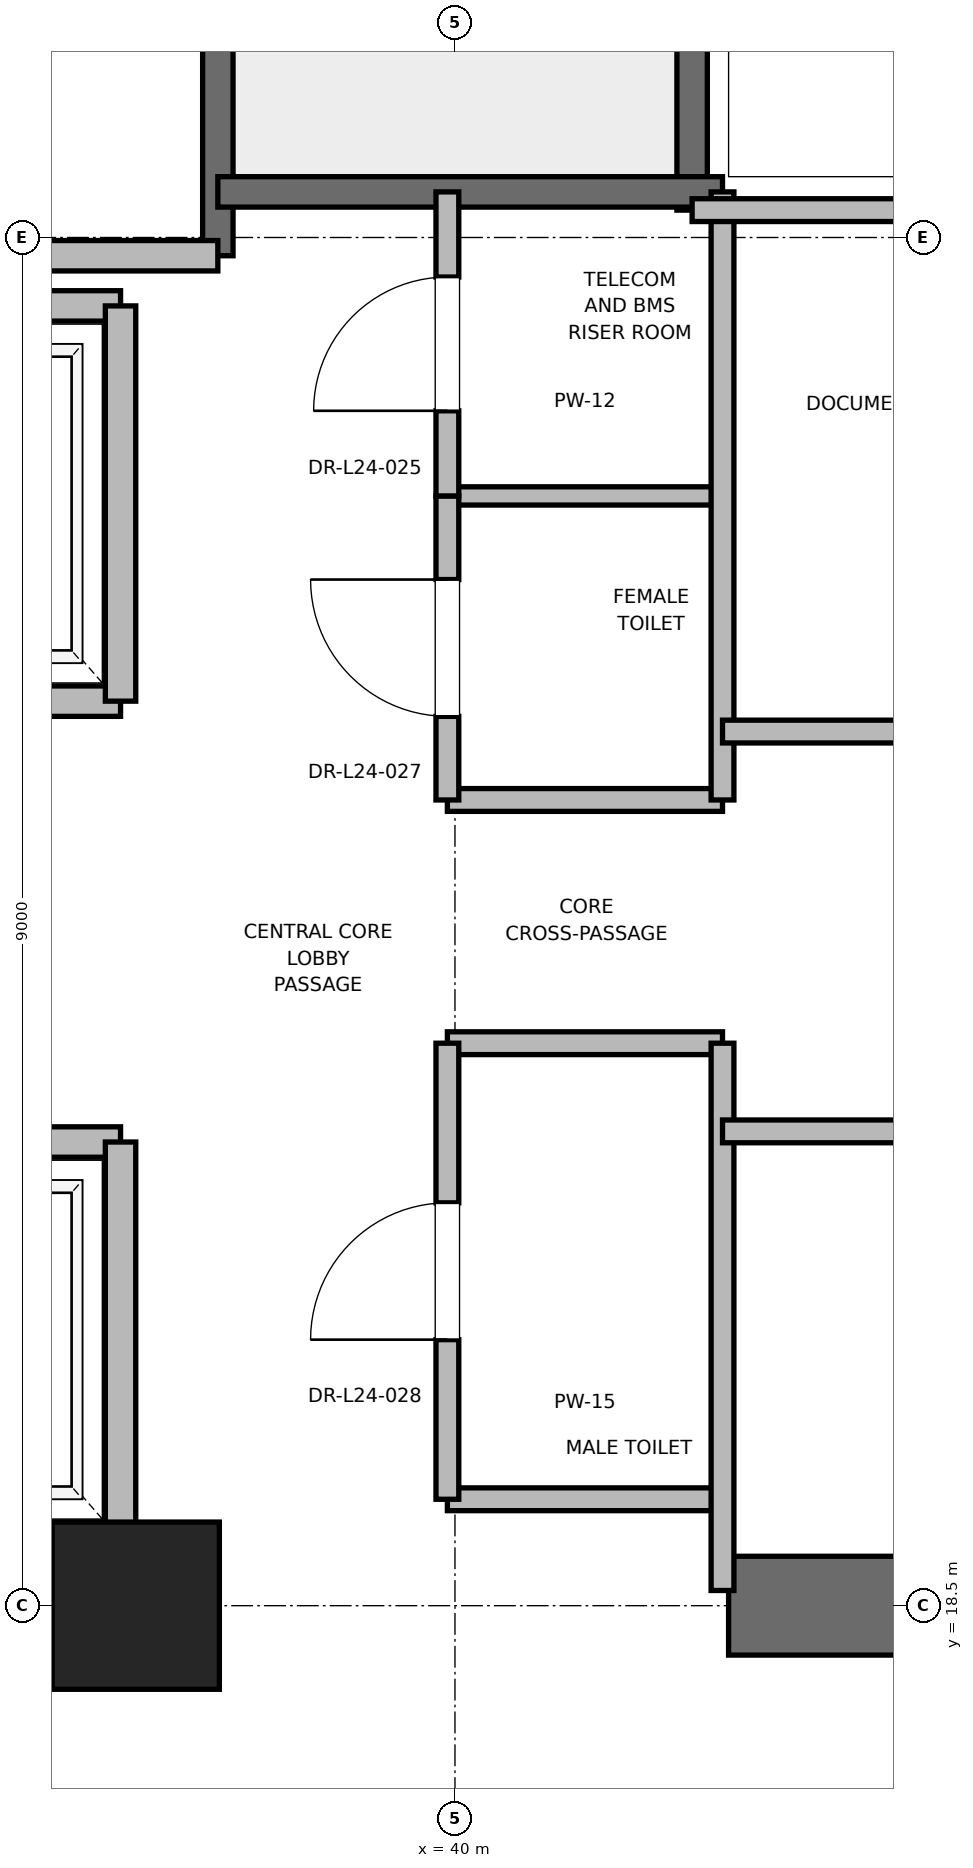
"""IFC4 building model, lengths in metres.
Left out: names, types, materials, properties, quantities, classifications, styles, units other than length and angle.
Written with IfcOpenShell. Run it as: python <this file> out.ifc"""

import sys

from ifc_helpers import new_model, si_unit, direction, frame, frame_2d, origin, origin_2d, place, context, subcontext, project, spatial, rectangle, extrude, element, fill, save


model = new_model("IFC4")
c1 = context("Model", 3, precision=1e-05, world=origin(), true_north=direction((0.0, 1.0)))
c2 = subcontext(c1, "Body", "Model", "MODEL_VIEW")
j1 = project(units=[si_unit("LENGTHUNIT", "METRE"), si_unit("PLANEANGLEUNIT", "RADIAN")], contexts=[c1])
p1 = place(None, origin())
s1 = spatial("IfcSite", under=j1, at=p1, CompositionType="ELEMENT")
p2 = place(p1, origin())
s2 = spatial("IfcBuilding", under=s1, at=p2, CompositionType="ELEMENT")
p3 = place(p2, frame((0.0, 0.0, 103.6)))
s3 = spatial("IfcBuildingStorey", under=s2, at=p3, CompositionType="ELEMENT", Elevation=103.6)
p4 = place(p3, frame((37.9, 18.5, 0.0), z_axis=(0.0, 0.0, 1.0), x_axis=(1.0, 0.0, 0.0)))
e1 = element("IfcColumn", 1, at=p4, inside=s3, PredefinedType="PILASTER", context=c2, shape_type="SweptSolid", body=[
    extrude(rectangle(XDim=1.1, YDim=1.1, at=origin_2d()), origin(), (0.0, 0.0, 1.0), 4.0),
])
for number, where, z_axis, x_axis in (
    (2, (29.0, 18.5, 0.0), (0.0, 0.0, 1.0), (1.0, 0.0, 0.0)),
    (3, (41.8, 18.5, 0.0), (0.0, 0.0, 1.0), (1.0, 0.0, 0.0)),
):
    element("IfcWall", number, at=place(p3, frame(where, z_axis=z_axis, x_axis=x_axis)), inside=s3, PredefinedType="SHEAR", context=c2, shape_type="SweptSolid", body=[
        extrude(rectangle(XDim=9.2, YDim=0.65, at=frame_2d((4.6, 0.0))), origin(), (0.0, 0.0, 1.0), 3.7),
    ])
p5 = place(p3, frame((38.44, 27.38, 0.0), z_axis=(0.0, 0.0, 1.0), x_axis=(0.0, 1.0, 0.0)))
e4 = element("IfcWall", 4, at=p5, inside=s3, PredefinedType="SOLIDWALL", context=c2, shape_type="SweptSolid", body=[
    extrude(rectangle(XDim=8.87, YDim=0.2, at=frame_2d((4.435, 0.0))), origin(), (0.0, 0.0, 1.0), 3.7),
])
p6 = place(p3, frame((41.56, 27.68, 0.0), z_axis=(0.0, 0.0, 1.0), x_axis=(0.0, 1.0, 0.0)))
e5 = element("IfcWall", 5, at=p6, inside=s3, PredefinedType="SOLIDWALL", context=c2, shape_type="SweptSolid", body=[
    extrude(rectangle(XDim=8.57, YDim=0.2, at=frame_2d((4.285, 0.0))), origin(), (0.0, 0.0, 1.0), 3.7),
])
p7 = place(p3, frame((38.44, 27.8, 0.0), z_axis=(0.0, 0.0, 1.0), x_axis=(1.0, 0.0, 0.0)))
e6 = element("IfcWall", 6, at=p7, inside=s3, PredefinedType="SOLIDWALL", context=c2, shape_type="SweptSolid", body=[
    extrude(rectangle(XDim=3.32, YDim=0.2, at=frame_2d((1.66, 0.0))), origin(), (0.0, 0.0, 1.0), 3.7),
])
p8 = place(p3, frame((32.82, 27.38, 0.0), z_axis=(0.0, 0.0, 1.0), x_axis=(1.0, 0.0, 0.0)))
e7 = element("IfcWall", 7, at=p8, inside=s3, PredefinedType="PARTITIONING", context=c2, shape_type="SweptSolid", body=[
    extrude(rectangle(XDim=5.62, YDim=0.2, at=frame_2d((2.81, 0.0))), origin(), (0.0, 0.0, 1.0), 3.7),
])
p9 = place(p3, frame((35.5, 18.95, 0.0), z_axis=(0.0, 0.0, 1.0), x_axis=(1.0, 0.0, 0.0)))
e8 = element("IfcWall", 8, at=p9, inside=s3, PredefinedType="SOLIDWALL", context=c2, shape_type="SweptSolid", body=[
    extrude(rectangle(XDim=2.3, YDim=0.2, at=frame_2d((1.15, 0.0))), origin(), (0.0, 0.0, 1.0), 2.48),
])
p10 = place(p3, frame((37.8, 21.55, 0.0), z_axis=(0.0, 0.0, 1.0), x_axis=(-1.0, 0.0, 0.0)))
e9 = element("IfcWall", 9, at=p10, inside=s3, PredefinedType="SOLIDWALL", context=c2, shape_type="SweptSolid", body=[
    extrude(rectangle(XDim=2.3, YDim=0.2, at=frame_2d((1.15, 0.0))), origin(), (0.0, 0.0, 1.0), 3.7),
])
p11 = place(p10, frame((0.6, 0.0, 0.0)))
e10 = element("IfcOpeningElement", 10, at=p11, cuts=e9, PredefinedType="OPENING", context=c2, shape_type="SweptSolid", body=[
    extrude(rectangle(XDim=1.1, YDim=2.2, at=frame_2d((0.55, 1.1))), frame((0.0, 0.1, 0.0), z_axis=(0.0, -1.0, 0.0), x_axis=(1.0, 0.0, 0.0)), (0.0, 0.0, 1.0), 0.2),
])
p12 = place(p3, frame((37.8, 18.95, 0.0), z_axis=(0.0, 0.0, 1.0), x_axis=(0.0, 1.0, 0.0)))
e11 = element("IfcWall", 11, at=p12, inside=s3, PredefinedType="SOLIDWALL", context=c2, shape_type="SweptSolid", body=[
    extrude(rectangle(XDim=2.6, YDim=0.2, at=frame_2d((1.3, 0.0))), origin(), (0.0, 0.0, 1.0), 2.48),
])
p13 = place(p3, frame((35.5, 24.45, 0.0), z_axis=(0.0, 0.0, 1.0), x_axis=(1.0, 0.0, 0.0)))
e12 = element("IfcWall", 12, at=p13, inside=s3, PredefinedType="SOLIDWALL", context=c2, shape_type="SweptSolid", body=[
    extrude(rectangle(XDim=2.3, YDim=0.2, at=frame_2d((1.15, 0.0))), origin(), (0.0, 0.0, 1.0), 3.7),
])
p14 = place(p13, frame((0.6, 0.0, 0.0)))
e13 = element("IfcOpeningElement", 13, at=p14, cuts=e12, PredefinedType="OPENING", context=c2, shape_type="SweptSolid", body=[
    extrude(rectangle(XDim=1.1, YDim=2.2, at=frame_2d((0.55, 1.1))), frame((0.0, 0.1, 0.0), z_axis=(0.0, -1.0, 0.0), x_axis=(1.0, 0.0, 0.0)), (0.0, 0.0, 1.0), 0.2),
])
p15 = place(p3, frame((37.8, 27.05, 0.0), z_axis=(0.0, 0.0, 1.0), x_axis=(-1.0, 0.0, 0.0)))
e14 = element("IfcWall", 14, at=p15, inside=s3, PredefinedType="SOLIDWALL", context=c2, shape_type="SweptSolid", body=[
    extrude(rectangle(XDim=2.3, YDim=0.2, at=frame_2d((1.15, 0.0))), origin(), (0.0, 0.0, 1.0), 3.7),
])
p16 = place(p3, frame((37.8, 24.45, 0.0), z_axis=(0.0, 0.0, 1.0), x_axis=(0.0, 1.0, 0.0)))
e15 = element("IfcWall", 15, at=p16, inside=s3, PredefinedType="SOLIDWALL", context=c2, shape_type="SweptSolid", body=[
    extrude(rectangle(XDim=2.6, YDim=0.2, at=frame_2d((1.3, 0.0))), origin(), (0.0, 0.0, 1.0), 3.7),
])
for number, where, z_axis, x_axis in (
    (16, (39.95, 19.2, 0.0), (0.0, 0.0, 1.0), (1.0, 0.0, 0.0)),
    (17, (39.95, 22.2, 0.0), (0.0, 0.0, 1.0), (1.0, 0.0, 0.0)),
    (18, (39.95, 23.8, 0.0), (0.0, 0.0, 1.0), (1.0, 0.0, 0.0)),
):
    element("IfcWall", number, at=place(p3, frame(where, z_axis=z_axis, x_axis=x_axis)), inside=s3, PredefinedType="PARTITIONING", context=c2, shape_type="SweptSolid", body=[
        extrude(rectangle(XDim=1.81, YDim=0.15, at=frame_2d((0.905, 0.0))), origin(), (0.0, 0.0, 1.0), 2.85),
    ])
p17 = place(p3, frame((39.95, 25.8, 0.0), z_axis=(0.0, 0.0, 1.0), x_axis=(1.0, 0.0, 0.0)))
e19 = element("IfcWall", 19, at=p17, inside=s3, PredefinedType="PARTITIONING", context=c2, shape_type="SweptSolid", body=[
    extrude(rectangle(XDim=1.81, YDim=0.12, at=frame_2d((0.905, 0.0))), origin(), (0.0, 0.0, 1.0), 2.85),
])
p18 = place(p3, frame((41.76, 18.6, 0.0), z_axis=(0.0, 0.0, 1.0), x_axis=(0.0, 1.0, 0.0)))
e20 = element("IfcWall", 20, at=p18, inside=s3, PredefinedType="PARTITIONING", context=c2, shape_type="SweptSolid", body=[
    extrude(rectangle(XDim=3.6, YDim=0.15, at=frame_2d((1.8, 0.0))), origin(), (0.0, 0.0, 1.0), 2.48),
])
p19 = place(p3, frame((41.76, 23.8, 0.0), z_axis=(0.0, 0.0, 1.0), x_axis=(0.0, 1.0, 0.0)))
e21 = element("IfcWall", 21, at=p19, inside=s3, PredefinedType="PARTITIONING", context=c2, shape_type="SweptSolid", body=[
    extrude(rectangle(XDim=4.0, YDim=0.15, at=frame_2d((2.0, 0.0))), origin(), (0.0, 0.0, 1.0), 2.85),
])
p20 = place(p3, frame((39.95, 19.2, 0.0), z_axis=(0.0, 0.0, 1.0), x_axis=(0.0, 1.0, 0.0)))
e22 = element("IfcWall", 22, at=p20, inside=s3, PredefinedType="PARTITIONING", context=c2, shape_type="SweptSolid", body=[
    extrude(rectangle(XDim=3.0, YDim=0.15, at=frame_2d((1.5, 0.0))), origin(), (0.0, 0.0, 1.0), 2.85),
])
p21 = place(p20, frame((1.05, 0.0, 0.0)))
e23 = element("IfcOpeningElement", 23, at=p21, cuts=e22, PredefinedType="OPENING", context=c2, shape_type="SweptSolid", body=[
    extrude(rectangle(XDim=0.9, YDim=2.1, at=frame_2d((0.45, 1.05))), frame((0.0, 0.075, 0.0), z_axis=(0.0, -1.0, 0.0), x_axis=(1.0, 0.0, 0.0)), (0.0, 0.0, 1.0), 0.15),
])
p22 = place(p3, frame((39.95, 23.8, 0.0), z_axis=(0.0, 0.0, 1.0), x_axis=(0.0, 1.0, 0.0)))
e24 = element("IfcWall", 24, at=p22, inside=s3, PredefinedType="PARTITIONING", context=c2, shape_type="SweptSolid", body=[
    extrude(rectangle(XDim=2.0, YDim=0.15, at=frame_2d((1.0, 0.0))), origin(), (0.0, 0.0, 1.0), 2.85),
])
p23 = place(p22, frame((0.55, 0.0, 0.0)))
e25 = element("IfcOpeningElement", 25, at=p23, cuts=e24, PredefinedType="OPENING", context=c2, shape_type="SweptSolid", body=[
    extrude(rectangle(XDim=0.9, YDim=2.1, at=frame_2d((0.45, 1.05))), frame((0.0, 0.075, 0.0), z_axis=(0.0, -1.0, 0.0), x_axis=(1.0, 0.0, 0.0)), (0.0, 0.0, 1.0), 0.15),
])
p24 = place(p3, frame((39.95, 25.8, 0.0), z_axis=(0.0, 0.0, 1.0), x_axis=(0.0, 1.0, 0.0)))
e26 = element("IfcWall", 26, at=p24, inside=s3, PredefinedType="PARTITIONING", context=c2, shape_type="SweptSolid", body=[
    extrude(rectangle(XDim=2.0, YDim=0.15, at=frame_2d((1.0, 0.0))), origin(), (0.0, 0.0, 1.0), 2.85),
])
p25 = place(p24, frame((0.56, 0.0, 0.0)))
e27 = element("IfcOpeningElement", 27, at=p25, cuts=e26, PredefinedType="OPENING", context=c2, shape_type="SweptSolid", body=[
    extrude(rectangle(XDim=0.88, YDim=2.1, at=frame_2d((0.44, 1.05))), frame((0.0, 0.075, 0.0), z_axis=(0.0, -1.0, 0.0), x_axis=(1.0, 0.0, 0.0)), (0.0, 0.0, 1.0), 0.15),
])
p26 = place(p3, frame((41.56, 27.68, 0.0), z_axis=(0.0, 0.0, 1.0), x_axis=(1.0, 0.0, 0.0)))
e28 = element("IfcWall", 28, at=p26, inside=s3, PredefinedType="PARTITIONING", context=c2, shape_type="SweptSolid", body=[
    extrude(rectangle(XDim=3.59, YDim=0.15, at=frame_2d((1.795, 0.0))), origin(), (0.0, 0.0, 1.0), 2.85),
])
p27 = place(p3, frame((41.76, 21.62, 0.0), z_axis=(0.0, 0.0, 1.0), x_axis=(1.0, 0.0, 0.0)))
e29 = element("IfcWall", 29, at=p27, inside=s3, PredefinedType="PARTITIONING", context=c2, shape_type="SweptSolid", body=[
    extrude(rectangle(XDim=5.98, YDim=0.15, at=frame_2d((2.99, 0.0))), origin(), (0.0, 0.0, 1.0), 2.85),
])
p28 = place(p27, frame((2.49, 0.0, 0.0)))
e30 = element("IfcOpeningElement", 30, at=p28, cuts=e29, PredefinedType="OPENING", context=c2, shape_type="SweptSolid", body=[
    extrude(rectangle(XDim=1.0, YDim=2.15, at=frame_2d((0.5, 1.075))), frame((0.0, 0.075, 0.0), z_axis=(0.0, -1.0, 0.0), x_axis=(1.0, 0.0, 0.0)), (0.0, 0.0, 1.0), 0.15),
])
p29 = place(p3, frame((41.76, 24.25, 0.0), z_axis=(0.0, 0.0, 1.0), x_axis=(1.0, 0.0, 0.0)))
e31 = element("IfcWall", 31, at=p29, inside=s3, PredefinedType="PARTITIONING", context=c2, shape_type="SweptSolid", body=[
    extrude(rectangle(XDim=3.39, YDim=0.15, at=frame_2d((1.695, 0.0))), origin(), (0.0, 0.0, 1.0), 2.85),
])
p30 = place(p29, frame((1.195, 0.0, 0.0)))
e32 = element("IfcOpeningElement", 32, at=p30, cuts=e31, PredefinedType="OPENING", context=c2, shape_type="SweptSolid", body=[
    extrude(rectangle(XDim=1.0, YDim=2.15, at=frame_2d((0.5, 1.075))), frame((0.0, 0.075, 0.0), z_axis=(0.0, -1.0, 0.0), x_axis=(1.0, 0.0, 0.0)), (0.0, 0.0, 1.0), 0.15),
])
p31 = place(p21, origin())
e33 = element("IfcDoor", 33, at=p31, inside=s3, OperationType="SINGLE_SWING_LEFT", PredefinedType="DOOR", context=c2, shape_type="SweptSolid", body=[
    extrude(rectangle(XDim=0.9, YDim=2.1, at=frame_2d((0.45, 1.05))), frame((0.0, 0.025, 0.0), z_axis=(0.0, -1.0, 0.0), x_axis=(1.0, 0.0, 0.0)), (0.0, 0.0, 1.0), 0.05),
])
fill(e23, e33)
p32 = place(p23, origin())
e34 = element("IfcDoor", 34, at=p32, inside=s3, OperationType="SINGLE_SWING_RIGHT", PredefinedType="DOOR", context=c2, shape_type="SweptSolid", body=[
    extrude(rectangle(XDim=0.9, YDim=2.1, at=frame_2d((0.45, 1.05))), frame((0.0, 0.025, 0.0), z_axis=(0.0, -1.0, 0.0), x_axis=(1.0, 0.0, 0.0)), (0.0, 0.0, 1.0), 0.05),
])
fill(e25, e34)
p33 = place(p25, origin())
e35 = element("IfcDoor", 35, at=p33, inside=s3, OperationType="SINGLE_SWING_LEFT", PredefinedType="DOOR", context=c2, shape_type="SweptSolid", body=[
    extrude(rectangle(XDim=0.88, YDim=2.1, at=frame_2d((0.44, 1.05))), frame((0.0, 0.025, 0.0), z_axis=(0.0, -1.0, 0.0), x_axis=(1.0, 0.0, 0.0)), (0.0, 0.0, 1.0), 0.05),
])
fill(e27, e35)
save(model, sys.argv[1])
